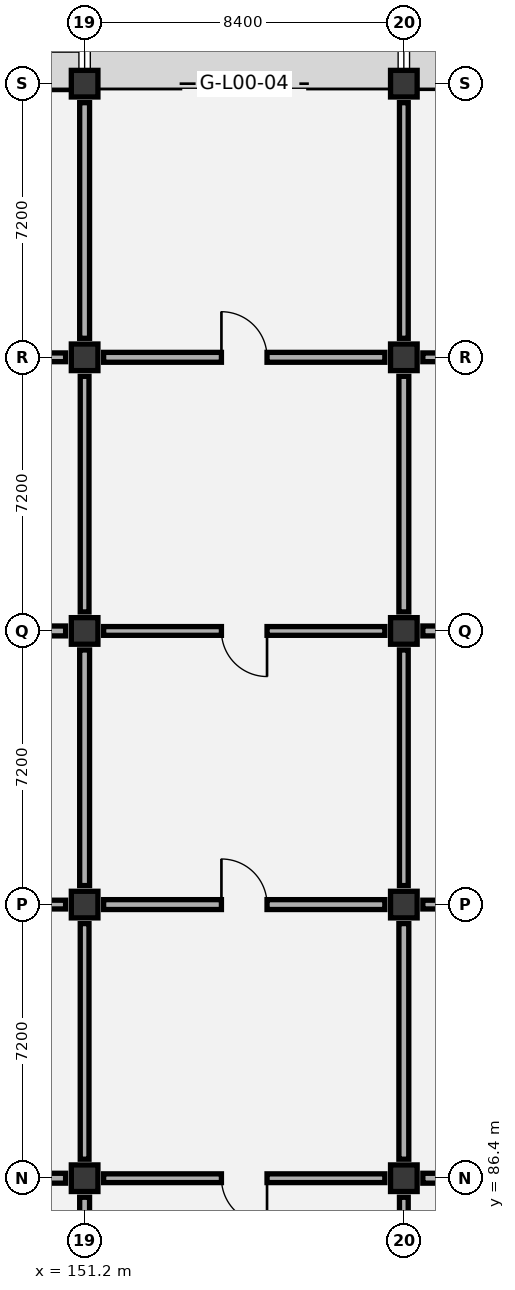
"""IFC4 building model, lengths in metres.
Left out: names, types, materials, properties, quantities, classifications, styles, units other than length and angle.
Written with IfcOpenShell. Run it as: python <this file> out.ifc"""

import sys

from ifc_helpers import new_model, si_unit, direction, frame, frame_2d, origin, origin_2d, place, context, subcontext, project, spatial, rectangle, extrude, element, fill, save


model = new_model("IFC4")
c1 = context("Model", 3, precision=1e-05, world=origin(), true_north=direction((0.0, 1.0)))
c2 = subcontext(c1, "Body", "Model", "MODEL_VIEW")
j1 = project(units=[si_unit("LENGTHUNIT", "METRE"), si_unit("PLANEANGLEUNIT", "RADIAN")], contexts=[c1])
p1 = place(None, origin())
s1 = spatial("IfcSite", under=j1, at=p1, CompositionType="ELEMENT")
p2 = place(p1, origin())
s2 = spatial("IfcBuilding", under=s1, at=p2, CompositionType="ELEMENT")
p3 = place(p2, origin())
s3 = spatial("IfcBuildingStorey", under=s2, at=p3, CompositionType="ELEMENT", Elevation=0.0)
for number, where, z_axis, x_axis in (
    (1, (151.2, 86.4, 0.0), (0.0, 0.0, 1.0), (1.0, 0.0, 0.0)),
    (2, (151.2, 93.6, 0.0), (0.0, 0.0, 1.0), (1.0, 0.0, 0.0)),
    (3, (151.2, 100.8, 0.0), (0.0, 0.0, 1.0), (1.0, 0.0, 0.0)),
    (4, (151.2, 108.0, 0.0), (0.0, 0.0, 1.0), (1.0, 0.0, 0.0)),
    (5, (151.2, 115.2, 0.0), (0.0, 0.0, 1.0), (1.0, 0.0, 0.0)),
    (6, (159.6, 86.4, 0.0), (0.0, 0.0, 1.0), (1.0, 0.0, 0.0)),
    (7, (159.6, 93.6, 0.0), (0.0, 0.0, 1.0), (1.0, 0.0, 0.0)),
    (8, (159.6, 100.8, 0.0), (0.0, 0.0, 1.0), (1.0, 0.0, 0.0)),
    (9, (159.6, 108.0, 0.0), (0.0, 0.0, 1.0), (1.0, 0.0, 0.0)),
    (10, (159.6, 115.2, 0.0), (0.0, 0.0, 1.0), (1.0, 0.0, 0.0)),
):
    element("IfcColumn", number, at=place(p3, frame(where, z_axis=z_axis, x_axis=x_axis)), inside=s3, PredefinedType="COLUMN", context=c2, shape_type="SweptSolid", body=[
        extrude(rectangle(XDim=0.7, YDim=0.7, at=origin_2d()), origin(), (0.0, 0.0, 1.0), 6.0),
    ])
p4 = place(p3, frame((143.15, 115.2, 0.0), z_axis=(0.0, 0.0, 1.0), x_axis=(1.0, 0.0, 0.0)))
e11 = element("IfcWall", 11, at=p4, inside=s3, PredefinedType="SOLIDWALL", context=c2, shape_type="SweptSolid", body=[
    extrude(rectangle(XDim=7.7, YDim=0.31, at=frame_2d((3.85, 0.0))), origin(), (0.0, 0.0, 1.0), 5.12),
])
p5 = place(p4, frame((2.45, 0.0, 0.0)))
e12 = element("IfcOpeningElement", 12, at=p5, cuts=e11, PredefinedType="OPENING", context=c2, shape_type="SweptSolid", body=[
    extrude(rectangle(XDim=2.8, YDim=3.0, at=frame_2d((1.4, 1.5))), frame((0.0, 0.165, 0.0), z_axis=(0.0, -1.0, 0.0), x_axis=(1.0, 0.0, 0.0)), (0.0, 0.0, 1.0), 0.33),
])
p6 = place(p3, frame((151.55, 115.2, 0.0), z_axis=(0.0, 0.0, 1.0), x_axis=(1.0, 0.0, 0.0)))
e13 = element("IfcWall", 13, at=p6, inside=s3, PredefinedType="SOLIDWALL", context=c2, shape_type="SweptSolid", body=[
    extrude(rectangle(XDim=7.7, YDim=0.215, at=frame_2d((3.85, 0.0))), origin(), (0.0, 0.0, 1.0), 5.12),
])
p7 = place(p6, frame((2.15, 0.0, 0.0)))
e14 = element("IfcOpeningElement", 14, at=p7, cuts=e13, PredefinedType="OPENING", context=c2, shape_type="SweptSolid", body=[
    extrude(rectangle(XDim=3.4, YDim=3.4, at=frame_2d((1.7, 1.7))), frame((0.0, 0.117, 0.0), z_axis=(0.0, -1.0, 0.0), x_axis=(1.0, 0.0, 0.0)), (0.0, 0.0, 1.0), 0.235),
])
p8 = place(p3, frame((159.95, 115.2, 0.0), z_axis=(0.0, 0.0, 1.0), x_axis=(1.0, 0.0, 0.0)))
e15 = element("IfcWall", 15, at=p8, inside=s3, PredefinedType="SOLIDWALL", context=c2, shape_type="SweptSolid", body=[
    extrude(rectangle(XDim=7.65, YDim=0.25, at=frame_2d((3.825, 0.0))), origin(), (0.0, 0.0, 1.0), 5.12),
])
p9 = place(p8, frame((2.125, 0.0, 0.0)))
e16 = element("IfcOpeningElement", 16, at=p9, cuts=e15, PredefinedType="OPENING", context=c2, shape_type="SweptSolid", body=[
    extrude(rectangle(XDim=3.4, YDim=3.4, at=frame_2d((1.7, 1.7))), frame((0.0, 0.135, 0.0), z_axis=(0.0, -1.0, 0.0), x_axis=(1.0, 0.0, 0.0)), (0.0, 0.0, 1.0), 0.27),
])
p10 = place(p3, frame((151.2, 79.7, 0.0), z_axis=(0.0, 0.0, 1.0), x_axis=(0.0, 1.0, 0.0)))
e17 = element("IfcWall", 17, at=p10, inside=s3, PredefinedType="PARTITIONING", context=c2, shape_type="SweptSolid", body=[
    extrude(rectangle(XDim=6.2, YDim=0.26, at=frame_2d((3.1, 0.0))), origin(), (0.0, 0.0, 1.0), 4.92),
])
p11 = place(p10, frame((2.5, 0.0, 0.0)))
e18 = element("IfcOpeningElement", 18, at=p11, cuts=e17, PredefinedType="OPENING", context=c2, shape_type="SweptSolid", body=[
    extrude(rectangle(XDim=1.2, YDim=2.1, at=frame_2d((0.6, 1.05))), frame((0.0, 0.14, 0.0), z_axis=(0.0, -1.0, 0.0), x_axis=(1.0, 0.0, 0.0)), (0.0, 0.0, 1.0), 0.28),
])
p12 = place(p3, frame((143.3, 86.4, 0.0), z_axis=(0.0, 0.0, 1.0), x_axis=(1.0, 0.0, 0.0)))
e19 = element("IfcWall", 19, at=p12, inside=s3, PredefinedType="PARTITIONING", context=c2, shape_type="SweptSolid", body=[
    extrude(rectangle(XDim=7.4, YDim=0.26, at=frame_2d((3.7, 0.0))), origin(), (0.0, 0.0, 1.0), 4.87),
])
p13 = place(p12, frame((3.1, 0.0, 0.0)))
e20 = element("IfcOpeningElement", 20, at=p13, cuts=e19, PredefinedType="OPENING", context=c2, shape_type="SweptSolid", body=[
    extrude(rectangle(XDim=1.2, YDim=2.1, at=frame_2d((0.6, 1.05))), frame((0.0, 0.14, 0.0), z_axis=(0.0, -1.0, 0.0), x_axis=(1.0, 0.0, 0.0)), (0.0, 0.0, 1.0), 0.28),
])
p14 = place(p3, frame((151.2, 86.9, 0.0), z_axis=(0.0, 0.0, 1.0), x_axis=(0.0, 1.0, 0.0)))
e21 = element("IfcWall", 21, at=p14, inside=s3, PredefinedType="PARTITIONING", context=c2, shape_type="SweptSolid", body=[
    extrude(rectangle(XDim=6.2, YDim=0.23, at=frame_2d((3.1, 0.0))), origin(), (0.0, 0.0, 1.0), 5.27),
])
p15 = place(p3, frame((143.3, 93.6, 0.0), z_axis=(0.0, 0.0, 1.0), x_axis=(1.0, 0.0, 0.0)))
e22 = element("IfcWall", 22, at=p15, inside=s3, PredefinedType="PARTITIONING", context=c2, shape_type="SweptSolid", body=[
    extrude(rectangle(XDim=7.4, YDim=0.23, at=frame_2d((3.7, 0.0))), origin(), (0.0, 0.0, 1.0), 4.87),
])
p16 = place(p15, frame((3.1, 0.0, 0.0)))
e23 = element("IfcOpeningElement", 23, at=p16, cuts=e22, PredefinedType="OPENING", context=c2, shape_type="SweptSolid", body=[
    extrude(rectangle(XDim=1.2, YDim=2.1, at=frame_2d((0.6, 1.05))), frame((0.0, 0.125, 0.0), z_axis=(0.0, -1.0, 0.0), x_axis=(1.0, 0.0, 0.0)), (0.0, 0.0, 1.0), 0.25),
])
p17 = place(p3, frame((151.2, 94.1, 0.0), z_axis=(0.0, 0.0, 1.0), x_axis=(0.0, 1.0, 0.0)))
e24 = element("IfcWall", 24, at=p17, inside=s3, PredefinedType="PARTITIONING", context=c2, shape_type="SweptSolid", body=[
    extrude(rectangle(XDim=6.2, YDim=0.26, at=frame_2d((3.1, 0.0))), origin(), (0.0, 0.0, 1.0), 5.02),
])
p18 = place(p3, frame((143.3, 100.8, 0.0), z_axis=(0.0, 0.0, 1.0), x_axis=(1.0, 0.0, 0.0)))
e25 = element("IfcWall", 25, at=p18, inside=s3, PredefinedType="PARTITIONING", context=c2, shape_type="SweptSolid", body=[
    extrude(rectangle(XDim=7.4, YDim=0.26, at=frame_2d((3.7, 0.0))), origin(), (0.0, 0.0, 1.0), 4.97),
])
p19 = place(p18, frame((3.1, 0.0, 0.0)))
e26 = element("IfcOpeningElement", 26, at=p19, cuts=e25, PredefinedType="OPENING", context=c2, shape_type="SweptSolid", body=[
    extrude(rectangle(XDim=1.2, YDim=2.1, at=frame_2d((0.6, 1.05))), frame((0.0, 0.14, 0.0), z_axis=(0.0, -1.0, 0.0), x_axis=(1.0, 0.0, 0.0)), (0.0, 0.0, 1.0), 0.28),
])
p20 = place(p3, frame((151.2, 101.3, 0.0), z_axis=(0.0, 0.0, 1.0), x_axis=(0.0, 1.0, 0.0)))
e27 = element("IfcWall", 27, at=p20, inside=s3, PredefinedType="PARTITIONING", context=c2, shape_type="SweptSolid", body=[
    extrude(rectangle(XDim=6.2, YDim=0.23, at=frame_2d((3.1, 0.0))), origin(), (0.0, 0.0, 1.0), 5.48),
])
p21 = place(p3, frame((143.3, 108.0, 0.0), z_axis=(0.0, 0.0, 1.0), x_axis=(1.0, 0.0, 0.0)))
e28 = element("IfcWall", 28, at=p21, inside=s3, PredefinedType="PARTITIONING", context=c2, shape_type="SweptSolid", body=[
    extrude(rectangle(XDim=7.4, YDim=0.23, at=frame_2d((3.7, 0.0))), origin(), (0.0, 0.0, 1.0), 4.97),
])
p22 = place(p21, frame((3.1, 0.0, 0.0)))
e29 = element("IfcOpeningElement", 29, at=p22, cuts=e28, PredefinedType="OPENING", context=c2, shape_type="SweptSolid", body=[
    extrude(rectangle(XDim=1.2, YDim=2.1, at=frame_2d((0.6, 1.05))), frame((0.0, 0.125, 0.0), z_axis=(0.0, -1.0, 0.0), x_axis=(1.0, 0.0, 0.0)), (0.0, 0.0, 1.0), 0.25),
])
p23 = place(p3, frame((151.2, 108.5, 0.0), z_axis=(0.0, 0.0, 1.0), x_axis=(0.0, 1.0, 0.0)))
e30 = element("IfcWall", 30, at=p23, inside=s3, PredefinedType="PARTITIONING", context=c2, shape_type="SweptSolid", body=[
    extrude(rectangle(XDim=6.2, YDim=0.26, at=frame_2d((3.1, 0.0))), origin(), (0.0, 0.0, 1.0), 5.02),
])
p24 = place(p3, frame((159.6, 79.7, 0.0), z_axis=(0.0, 0.0, 1.0), x_axis=(0.0, 1.0, 0.0)))
e31 = element("IfcWall", 31, at=p24, inside=s3, PredefinedType="PARTITIONING", context=c2, shape_type="SweptSolid", body=[
    extrude(rectangle(XDim=6.2, YDim=0.23, at=frame_2d((3.1, 0.0))), origin(), (0.0, 0.0, 1.0), 5.27),
])
p25 = place(p24, frame((2.5, 0.0, 0.0)))
e32 = element("IfcOpeningElement", 32, at=p25, cuts=e31, PredefinedType="OPENING", context=c2, shape_type="SweptSolid", body=[
    extrude(rectangle(XDim=1.2, YDim=2.1, at=frame_2d((0.6, 1.05))), frame((0.0, 0.125, 0.0), z_axis=(0.0, -1.0, 0.0), x_axis=(1.0, 0.0, 0.0)), (0.0, 0.0, 1.0), 0.25),
])
p26 = place(p3, frame((151.7, 86.4, 0.0), z_axis=(0.0, 0.0, 1.0), x_axis=(1.0, 0.0, 0.0)))
e33 = element("IfcWall", 33, at=p26, inside=s3, PredefinedType="PARTITIONING", context=c2, shape_type="SweptSolid", body=[
    extrude(rectangle(XDim=7.4, YDim=0.23, at=frame_2d((3.7, 0.0))), origin(), (0.0, 0.0, 1.0), 4.87),
])
p27 = place(p26, frame((3.1, 0.0, 0.0)))
e34 = element("IfcOpeningElement", 34, at=p27, cuts=e33, PredefinedType="OPENING", context=c2, shape_type="SweptSolid", body=[
    extrude(rectangle(XDim=1.2, YDim=2.1, at=frame_2d((0.6, 1.05))), frame((0.0, 0.125, 0.0), z_axis=(0.0, -1.0, 0.0), x_axis=(1.0, 0.0, 0.0)), (0.0, 0.0, 1.0), 0.25),
])
p28 = place(p3, frame((159.6, 86.9, 0.0), z_axis=(0.0, 0.0, 1.0), x_axis=(0.0, 1.0, 0.0)))
e35 = element("IfcWall", 35, at=p28, inside=s3, PredefinedType="PARTITIONING", context=c2, shape_type="SweptSolid", body=[
    extrude(rectangle(XDim=6.2, YDim=0.26, at=frame_2d((3.1, 0.0))), origin(), (0.0, 0.0, 1.0), 4.92),
])
p29 = place(p3, frame((151.7, 93.6, 0.0), z_axis=(0.0, 0.0, 1.0), x_axis=(1.0, 0.0, 0.0)))
e36 = element("IfcWall", 36, at=p29, inside=s3, PredefinedType="PARTITIONING", context=c2, shape_type="SweptSolid", body=[
    extrude(rectangle(XDim=7.4, YDim=0.26, at=frame_2d((3.7, 0.0))), origin(), (0.0, 0.0, 1.0), 4.87),
])
p30 = place(p29, frame((3.1, 0.0, 0.0)))
e37 = element("IfcOpeningElement", 37, at=p30, cuts=e36, PredefinedType="OPENING", context=c2, shape_type="SweptSolid", body=[
    extrude(rectangle(XDim=1.2, YDim=2.1, at=frame_2d((0.6, 1.05))), frame((0.0, 0.14, 0.0), z_axis=(0.0, -1.0, 0.0), x_axis=(1.0, 0.0, 0.0)), (0.0, 0.0, 1.0), 0.28),
])
p31 = place(p3, frame((159.6, 94.1, 0.0), z_axis=(0.0, 0.0, 1.0), x_axis=(0.0, 1.0, 0.0)))
e38 = element("IfcWall", 38, at=p31, inside=s3, PredefinedType="PARTITIONING", context=c2, shape_type="SweptSolid", body=[
    extrude(rectangle(XDim=6.2, YDim=0.23, at=frame_2d((3.1, 0.0))), origin(), (0.0, 0.0, 1.0), 5.48),
])
p32 = place(p3, frame((151.7, 100.8, 0.0), z_axis=(0.0, 0.0, 1.0), x_axis=(1.0, 0.0, 0.0)))
e39 = element("IfcWall", 39, at=p32, inside=s3, PredefinedType="PARTITIONING", context=c2, shape_type="SweptSolid", body=[
    extrude(rectangle(XDim=7.4, YDim=0.23, at=frame_2d((3.7, 0.0))), origin(), (0.0, 0.0, 1.0), 4.97),
])
p33 = place(p32, frame((3.1, 0.0, 0.0)))
e40 = element("IfcOpeningElement", 40, at=p33, cuts=e39, PredefinedType="OPENING", context=c2, shape_type="SweptSolid", body=[
    extrude(rectangle(XDim=1.2, YDim=2.1, at=frame_2d((0.6, 1.05))), frame((0.0, 0.125, 0.0), z_axis=(0.0, -1.0, 0.0), x_axis=(1.0, 0.0, 0.0)), (0.0, 0.0, 1.0), 0.25),
])
p34 = place(p3, frame((159.6, 101.3, 0.0), z_axis=(0.0, 0.0, 1.0), x_axis=(0.0, 1.0, 0.0)))
e41 = element("IfcWall", 41, at=p34, inside=s3, PredefinedType="PARTITIONING", context=c2, shape_type="SweptSolid", body=[
    extrude(rectangle(XDim=6.2, YDim=0.26, at=frame_2d((3.1, 0.0))), origin(), (0.0, 0.0, 1.0), 5.02),
])
p35 = place(p3, frame((151.7, 108.0, 0.0), z_axis=(0.0, 0.0, 1.0), x_axis=(1.0, 0.0, 0.0)))
e42 = element("IfcWall", 42, at=p35, inside=s3, PredefinedType="PARTITIONING", context=c2, shape_type="SweptSolid", body=[
    extrude(rectangle(XDim=7.4, YDim=0.26, at=frame_2d((3.7, 0.0))), origin(), (0.0, 0.0, 1.0), 4.97),
])
p36 = place(p35, frame((3.1, 0.0, 0.0)))
e43 = element("IfcOpeningElement", 43, at=p36, cuts=e42, PredefinedType="OPENING", context=c2, shape_type="SweptSolid", body=[
    extrude(rectangle(XDim=1.2, YDim=2.1, at=frame_2d((0.6, 1.05))), frame((0.0, 0.14, 0.0), z_axis=(0.0, -1.0, 0.0), x_axis=(1.0, 0.0, 0.0)), (0.0, 0.0, 1.0), 0.28),
])
p37 = place(p3, frame((159.6, 108.5, 0.0), z_axis=(0.0, 0.0, 1.0), x_axis=(0.0, 1.0, 0.0)))
e44 = element("IfcWall", 44, at=p37, inside=s3, PredefinedType="PARTITIONING", context=c2, shape_type="SweptSolid", body=[
    extrude(rectangle(XDim=6.2, YDim=0.23, at=frame_2d((3.1, 0.0))), origin(), (0.0, 0.0, 1.0), 5.27),
])
p38 = place(p3, frame((160.1, 86.4, 0.0), z_axis=(0.0, 0.0, 1.0), x_axis=(1.0, 0.0, 0.0)))
e45 = element("IfcWall", 45, at=p38, inside=s3, PredefinedType="PARTITIONING", context=c2, shape_type="SweptSolid", body=[
    extrude(rectangle(XDim=7.4, YDim=0.26, at=frame_2d((3.7, 0.0))), origin(), (0.0, 0.0, 1.0), 4.87),
])
p39 = place(p38, frame((3.1, 0.0, 0.0)))
e46 = element("IfcOpeningElement", 46, at=p39, cuts=e45, PredefinedType="OPENING", context=c2, shape_type="SweptSolid", body=[
    extrude(rectangle(XDim=1.2, YDim=2.1, at=frame_2d((0.6, 1.05))), frame((0.0, 0.14, 0.0), z_axis=(0.0, -1.0, 0.0), x_axis=(1.0, 0.0, 0.0)), (0.0, 0.0, 1.0), 0.28),
])
p40 = place(p3, frame((160.1, 93.6, 0.0), z_axis=(0.0, 0.0, 1.0), x_axis=(1.0, 0.0, 0.0)))
e47 = element("IfcWall", 47, at=p40, inside=s3, PredefinedType="PARTITIONING", context=c2, shape_type="SweptSolid", body=[
    extrude(rectangle(XDim=7.4, YDim=0.23, at=frame_2d((3.7, 0.0))), origin(), (0.0, 0.0, 1.0), 4.87),
])
p41 = place(p40, frame((3.1, 0.0, 0.0)))
e48 = element("IfcOpeningElement", 48, at=p41, cuts=e47, PredefinedType="OPENING", context=c2, shape_type="SweptSolid", body=[
    extrude(rectangle(XDim=1.2, YDim=2.1, at=frame_2d((0.6, 1.05))), frame((0.0, 0.125, 0.0), z_axis=(0.0, -1.0, 0.0), x_axis=(1.0, 0.0, 0.0)), (0.0, 0.0, 1.0), 0.25),
])
p42 = place(p3, frame((160.1, 100.8, 0.0), z_axis=(0.0, 0.0, 1.0), x_axis=(1.0, 0.0, 0.0)))
e49 = element("IfcWall", 49, at=p42, inside=s3, PredefinedType="PARTITIONING", context=c2, shape_type="SweptSolid", body=[
    extrude(rectangle(XDim=7.4, YDim=0.26, at=frame_2d((3.7, 0.0))), origin(), (0.0, 0.0, 1.0), 4.97),
])
p43 = place(p42, frame((3.1, 0.0, 0.0)))
e50 = element("IfcOpeningElement", 50, at=p43, cuts=e49, PredefinedType="OPENING", context=c2, shape_type="SweptSolid", body=[
    extrude(rectangle(XDim=1.2, YDim=2.1, at=frame_2d((0.6, 1.05))), frame((0.0, 0.14, 0.0), z_axis=(0.0, -1.0, 0.0), x_axis=(1.0, 0.0, 0.0)), (0.0, 0.0, 1.0), 0.28),
])
p44 = place(p3, frame((160.1, 108.0, 0.0), z_axis=(0.0, 0.0, 1.0), x_axis=(1.0, 0.0, 0.0)))
e51 = element("IfcWall", 51, at=p44, inside=s3, PredefinedType="PARTITIONING", context=c2, shape_type="SweptSolid", body=[
    extrude(rectangle(XDim=7.4, YDim=0.23, at=frame_2d((3.7, 0.0))), origin(), (0.0, 0.0, 1.0), 4.97),
])
p45 = place(p44, frame((3.1, 0.0, 0.0)))
e52 = element("IfcOpeningElement", 52, at=p45, cuts=e51, PredefinedType="OPENING", context=c2, shape_type="SweptSolid", body=[
    extrude(rectangle(XDim=1.2, YDim=2.1, at=frame_2d((0.6, 1.05))), frame((0.0, 0.125, 0.0), z_axis=(0.0, -1.0, 0.0), x_axis=(1.0, 0.0, 0.0)), (0.0, 0.0, 1.0), 0.25),
])
p46 = place(p7, origin())
e53 = element("IfcDoor", 53, at=p46, inside=s3, OperationType="ROLLINGUP", PredefinedType="GATE", context=c2, shape_type="SweptSolid", body=[
    extrude(rectangle(XDim=3.4, YDim=3.4, at=frame_2d((1.7, 1.7))), frame((0.0, 0.025, 0.0), z_axis=(0.0, -1.0, 0.0), x_axis=(1.0, 0.0, 0.0)), (0.0, 0.0, 1.0), 0.05),
])
fill(e14, e53)
p47 = place(p27, frame((1.2, 0.0, 0.0), z_axis=(0.0, 0.0, 1.0), x_axis=(-1.0, 0.0, 0.0)))
e54 = element("IfcDoor", 54, at=p47, inside=s3, OperationType="SINGLE_SWING_LEFT", PredefinedType="DOOR", context=c2, shape_type="SweptSolid", body=[
    extrude(rectangle(XDim=1.2, YDim=2.1, at=frame_2d((0.6, 1.05))), frame((0.0, 0.025, 0.0), z_axis=(0.0, -1.0, 0.0), x_axis=(1.0, 0.0, 0.0)), (0.0, 0.0, 1.0), 0.05),
])
fill(e34, e54)
p48 = place(p30, origin())
e55 = element("IfcDoor", 55, at=p48, inside=s3, OperationType="SINGLE_SWING_LEFT", PredefinedType="DOOR", context=c2, shape_type="SweptSolid", body=[
    extrude(rectangle(XDim=1.2, YDim=2.1, at=frame_2d((0.6, 1.05))), frame((0.0, 0.025, 0.0), z_axis=(0.0, -1.0, 0.0), x_axis=(1.0, 0.0, 0.0)), (0.0, 0.0, 1.0), 0.05),
])
fill(e37, e55)
p49 = place(p33, frame((1.2, 0.0, 0.0), z_axis=(0.0, 0.0, 1.0), x_axis=(-1.0, 0.0, 0.0)))
e56 = element("IfcDoor", 56, at=p49, inside=s3, OperationType="SINGLE_SWING_LEFT", PredefinedType="DOOR", context=c2, shape_type="SweptSolid", body=[
    extrude(rectangle(XDim=1.2, YDim=2.1, at=frame_2d((0.6, 1.05))), frame((0.0, 0.025, 0.0), z_axis=(0.0, -1.0, 0.0), x_axis=(1.0, 0.0, 0.0)), (0.0, 0.0, 1.0), 0.05),
])
fill(e40, e56)
p50 = place(p36, origin())
e57 = element("IfcDoor", 57, at=p50, inside=s3, OperationType="SINGLE_SWING_LEFT", PredefinedType="DOOR", context=c2, shape_type="SweptSolid", body=[
    extrude(rectangle(XDim=1.2, YDim=2.1, at=frame_2d((0.6, 1.05))), frame((0.0, 0.025, 0.0), z_axis=(0.0, -1.0, 0.0), x_axis=(1.0, 0.0, 0.0)), (0.0, 0.0, 1.0), 0.05),
])
fill(e43, e57)
save(model, sys.argv[1])
